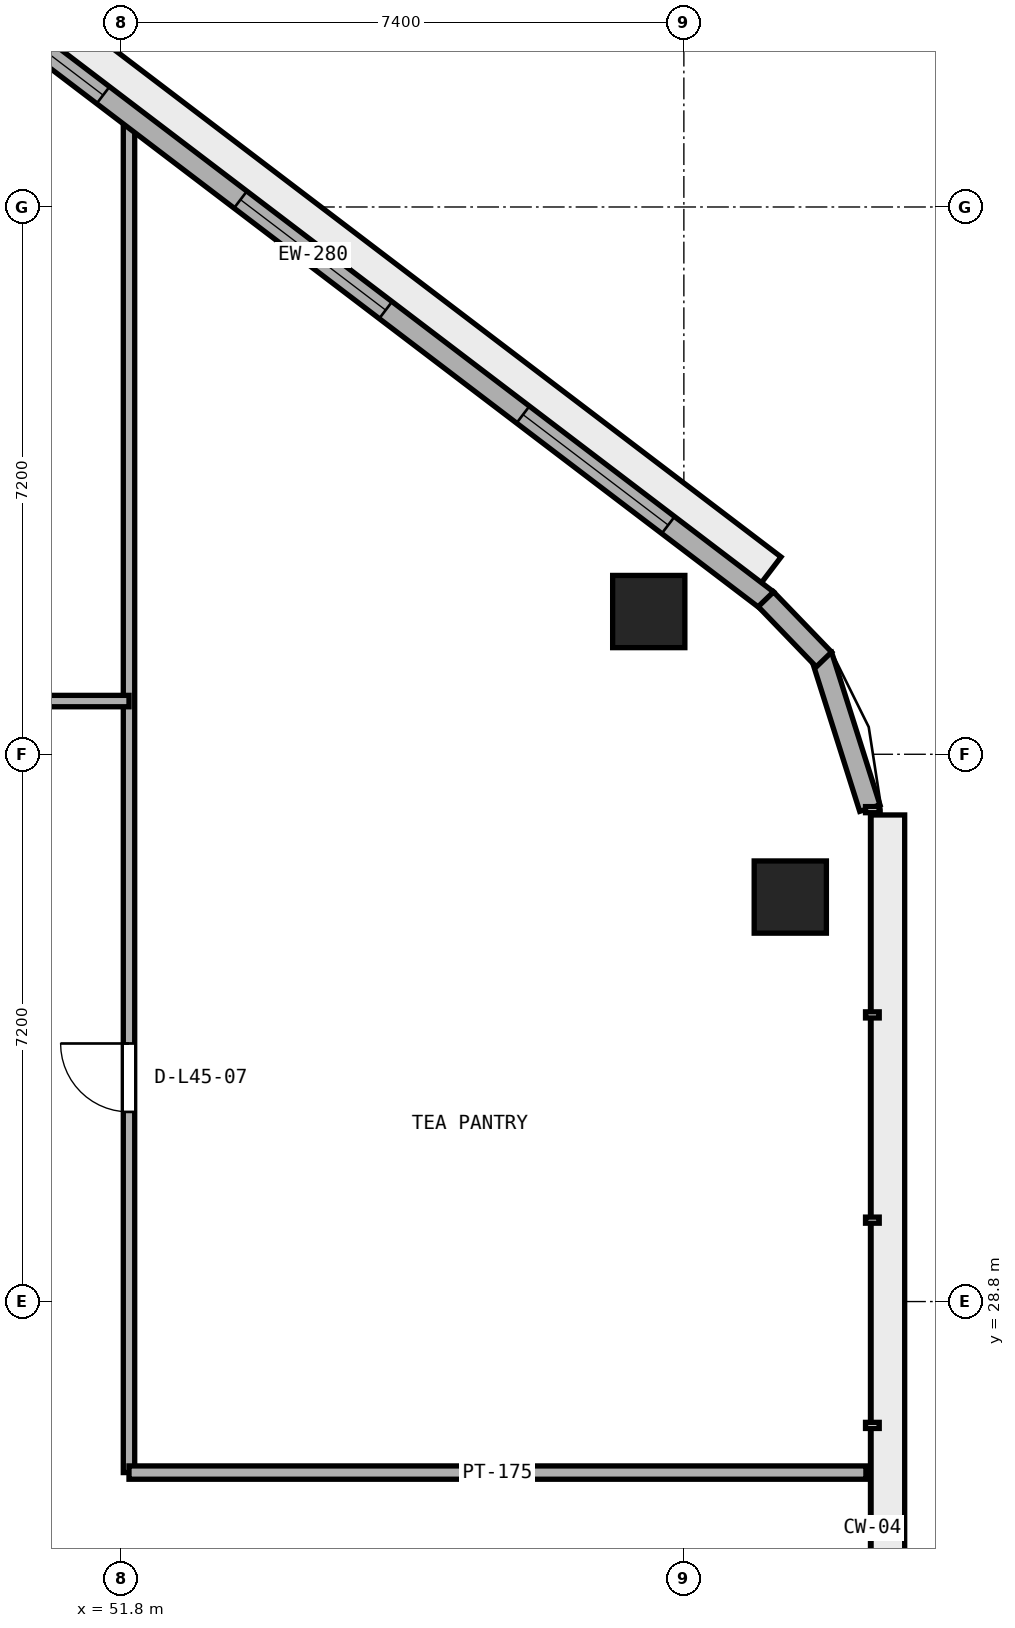
"""IFC4 building model, lengths in metres.
Left out: names, types, materials, properties, quantities, classifications, styles, units other than length and angle.
Written with IfcOpenShell. Run it as: python <this file> out.ifc"""

import sys

from ifc_helpers import new_model, si_unit, direction, frame, frame_2d, origin, origin_2d, place, context, subcontext, project, spatial, rectangle, extrude, element, fill, save


model = new_model("IFC4")
c1 = context("Model", 3, precision=1e-05, world=origin(), true_north=direction((0.0, 1.0)))
c2 = subcontext(c1, "Body", "Model", "MODEL_VIEW")
j1 = project(units=[si_unit("LENGTHUNIT", "METRE"), si_unit("PLANEANGLEUNIT", "RADIAN")], contexts=[c1])
p1 = place(None, origin())
s1 = spatial("IfcSite", under=j1, at=p1, CompositionType="ELEMENT")
p2 = place(p1, origin())
s2 = spatial("IfcBuilding", under=s1, at=p2, CompositionType="ELEMENT")
p3 = place(p2, frame((0.0, 0.0, 178.2)))
s3 = spatial("IfcBuildingStorey", under=s2, at=p3, CompositionType="ELEMENT", Elevation=178.2)
for number, where, z_axis, x_axis in (
    (1, (60.6, 34.122, 0.0), (0.0, 0.0, 1.0), (1.0, 0.0, 0.0)),
    (2, (58.738, 37.878, 0.0), (0.0, 0.0, 1.0), (1.0, 0.0, 0.0)),
):
    element("IfcColumn", number, at=place(p3, frame(where, z_axis=z_axis, x_axis=x_axis)), inside=s3, PredefinedType="COLUMN", context=c2, shape_type="SweptSolid", body=[
        extrude(rectangle(XDim=0.95, YDim=0.95, at=origin_2d()), origin(), (0.0, 0.0, 1.0), 3.8),
    ])
p4 = place(p3, frame((51.9, 26.55, 0.0), z_axis=(0.0, 0.0, 1.0), x_axis=(0.0, 1.0, 0.0)))
e3 = element("IfcWall", 3, at=p4, inside=s3, PredefinedType="PARTITIONING", context=c2, shape_type="SweptSolid", body=[
    extrude(rectangle(XDim=17.898, YDim=0.15, at=frame_2d((8.949, 0.0))), origin(), (0.0, 0.0, 1.0), 3.54),
])
p5 = place(p4, frame((4.745, 0.0, 0.0)))
e4 = element("IfcOpeningElement", 4, at=p5, cuts=e3, PredefinedType="OPENING", context=c2, shape_type="SweptSolid", body=[
    extrude(rectangle(XDim=0.9, YDim=2.1, at=frame_2d((0.45, 1.05))), frame((0.0, 0.085, 0.0), z_axis=(0.0, -1.0, 0.0), x_axis=(1.0, 0.0, 0.0)), (0.0, 0.0, 1.0), 0.17),
])
p6 = place(p3, frame((51.9, 26.55, 0.0), z_axis=(0.0, 0.0, 1.0), x_axis=(1.0, 0.0, 0.0)))
e5 = element("IfcWall", 5, at=p6, inside=s3, PredefinedType="PARTITIONING", context=c2, shape_type="SweptSolid", body=[
    extrude(rectangle(XDim=9.695, YDim=0.175, at=frame_2d((4.848, 0.0))), origin(), (0.0, 0.0, 1.0), 3.54),
])
p7 = place(p3, frame((22.1, 36.7, 0.0), z_axis=(0.0, 0.0, 1.0), x_axis=(1.0, 0.0, 0.0)))
e6 = element("IfcWall", 6, at=p7, inside=s3, PredefinedType="PARTITIONING", context=c2, shape_type="SweptSolid", body=[
    extrude(rectangle(XDim=29.8, YDim=0.15, at=frame_2d((14.9, 0.0))), origin(), (0.0, 0.0, 1.0), 3.54),
])
p8 = place(p7, frame((14.4, 0.0, 0.0)))
e7 = element("IfcOpeningElement", 7, at=p8, cuts=e6, PredefinedType="OPENING", context=c2, shape_type="SweptSolid", body=[
    extrude(rectangle(XDim=1.0, YDim=2.12, at=frame_2d((0.5, 1.06))), frame((0.0, 0.085, 0.0), z_axis=(0.0, -1.0, 0.0), x_axis=(1.0, 0.0, 0.0)), (0.0, 0.0, 1.0), 0.17),
])
p9 = place(p3, frame((60.295, 38.025, 0.0), z_axis=(0.0, 0.0, 1.0), x_axis=(-0.795831760834, 0.605517801925, 0.0)))
e8 = element("IfcWall", 8, at=p9, inside=s3, PredefinedType="STANDARD", context=c2, shape_type="SweptSolid", body=[
    extrude(rectangle(XDim=15.012, YDim=0.28, at=frame_2d((7.506, 0.0))), origin(), (0.0, 0.0, 1.0), 3.54),
])
p10 = place(p9, frame((1.635, 0.0, 0.9)))
e9 = element("IfcOpeningElement", 9, at=p10, cuts=e8, PredefinedType="OPENING", context=c2, shape_type="SweptSolid", body=[
    extrude(rectangle(XDim=2.4, YDim=1.75, at=frame_2d((1.2, 0.875))), frame((0.0, 0.15, 0.0), z_axis=(0.0, -1.0, 0.0), x_axis=(1.0, 0.0, 0.0)), (0.0, 0.0, 1.0), 0.3),
])
p11 = place(p9, frame((6.306, 0.0, 0.9)))
e10 = element("IfcOpeningElement", 10, at=p11, cuts=e8, PredefinedType="OPENING", context=c2, shape_type="SweptSolid", body=[
    extrude(rectangle(XDim=2.4, YDim=1.75, at=frame_2d((1.2, 0.875))), frame((0.0, 0.15, 0.0), z_axis=(0.0, -1.0, 0.0), x_axis=(1.0, 0.0, 0.0)), (0.0, 0.0, 1.0), 0.3),
])
p12 = place(p9, frame((10.977, 0.0, 0.9)))
e11 = element("IfcOpeningElement", 11, at=p12, cuts=e8, PredefinedType="OPENING", context=c2, shape_type="SweptSolid", body=[
    extrude(rectangle(XDim=2.4, YDim=1.75, at=frame_2d((1.2, 0.875))), frame((0.0, 0.15, 0.0), z_axis=(0.0, -1.0, 0.0), x_axis=(1.0, 0.0, 0.0)), (0.0, 0.0, 1.0), 0.3),
])
p13 = place(p3, frame((61.647, 35.291, 0.0), z_axis=(0.0, 0.0, 1.0), x_axis=(-0.302095077495, 0.953277800095, 0.0)))
e12 = element("IfcWall", 12, at=p13, inside=s3, PredefinedType="STANDARD", context=c2, shape_type="SweptSolid", body=[
    extrude(rectangle(XDim=2.109, YDim=0.28, at=frame_2d((1.055, 0.0))), origin(), (0.0, 0.0, 1.0), 3.54),
])
p14 = place(p3, frame((61.042, 37.247, 0.0), z_axis=(0.0, 0.0, 1.0), x_axis=(-0.694004126367, 0.719971022045, 0.0)))
e13 = element("IfcWall", 13, at=p14, inside=s3, PredefinedType="STANDARD", context=c2, shape_type="SweptSolid", body=[
    extrude(rectangle(XDim=1.1, YDim=0.28, at=frame_2d((0.55, 0.0))), origin(), (0.0, 0.0, 1.0), 3.54),
])
p15 = place(p5, origin())
e14 = element("IfcDoor", 14, at=p15, inside=s3, OperationType="SINGLE_SWING_RIGHT", PredefinedType="DOOR", context=c2, shape_type="SweptSolid", body=[
    extrude(rectangle(XDim=0.9, YDim=2.1, at=frame_2d((0.45, 1.05))), frame((0.0, 0.025, 0.0), z_axis=(0.0, -1.0, 0.0), x_axis=(1.0, 0.0, 0.0)), (0.0, 0.0, 1.0), 0.05),
])
fill(e4, e14)
p16 = place(p10, origin())
e15 = element("IfcWindow", 15, at=p16, inside=s3, PartitioningType="SINGLE_PANEL", PredefinedType="WINDOW", context=c2, shape_type="SweptSolid", body=[
    extrude(rectangle(XDim=2.4, YDim=1.75, at=frame_2d((1.2, 0.875))), frame((0.0, 0.03, 0.0), z_axis=(0.0, -1.0, 0.0), x_axis=(1.0, 0.0, 0.0)), (0.0, 0.0, 1.0), 0.06),
])
fill(e9, e15)
p17 = place(p11, origin())
e16 = element("IfcWindow", 16, at=p17, inside=s3, PartitioningType="SINGLE_PANEL", PredefinedType="WINDOW", context=c2, shape_type="SweptSolid", body=[
    extrude(rectangle(XDim=2.4, YDim=1.75, at=frame_2d((1.2, 0.875))), frame((0.0, 0.03, 0.0), z_axis=(0.0, -1.0, 0.0), x_axis=(1.0, 0.0, 0.0)), (0.0, 0.0, 1.0), 0.06),
])
fill(e10, e16)
p18 = place(p12, origin())
e17 = element("IfcWindow", 17, at=p18, inside=s3, PartitioningType="SINGLE_PANEL", PredefinedType="WINDOW", context=c2, shape_type="SweptSolid", body=[
    extrude(rectangle(XDim=2.4, YDim=1.75, at=frame_2d((1.2, 0.875))), frame((0.0, 0.03, 0.0), z_axis=(0.0, -1.0, 0.0), x_axis=(1.0, 0.0, 0.0)), (0.0, 0.0, 1.0), 0.06),
])
fill(e11, e17)
save(model, sys.argv[1])
